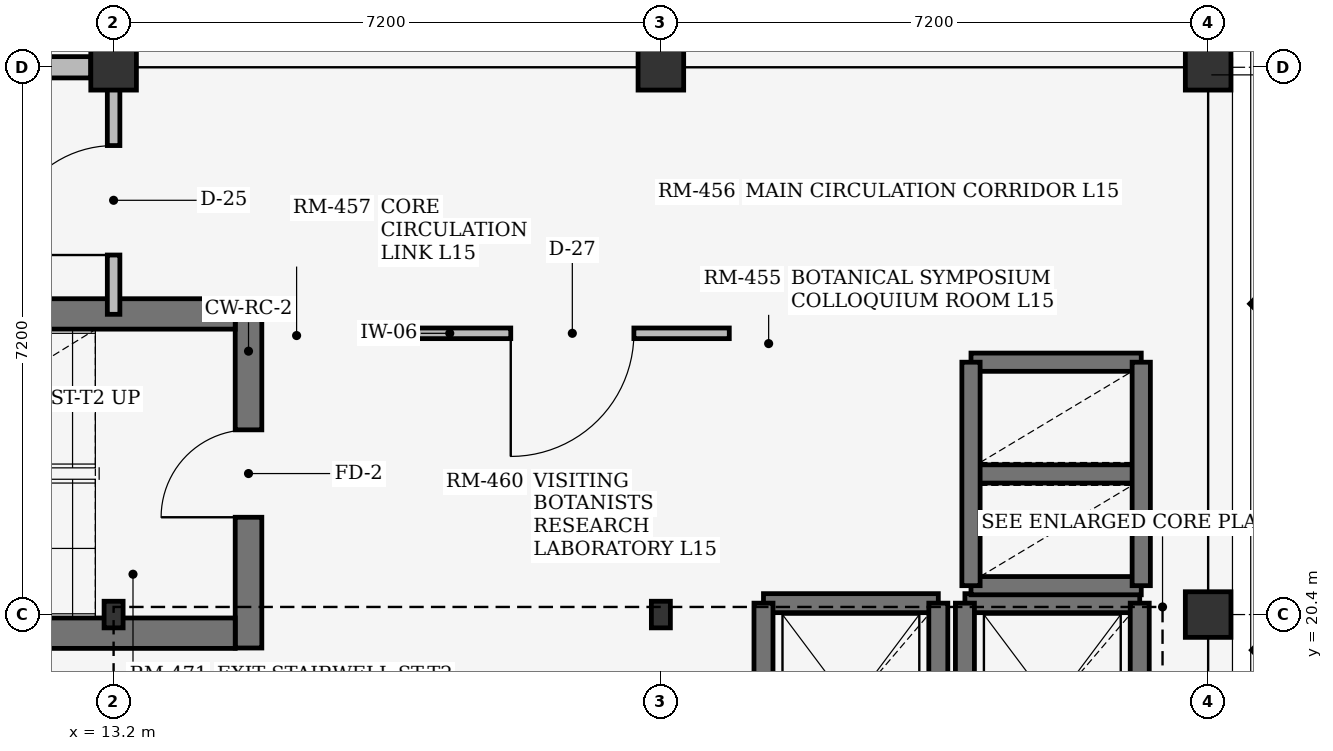
"""IFC4 building model, lengths in metres.
Left out: names, types, materials, properties, quantities, classifications, styles, units other than length and angle.
Written with IfcOpenShell. Run it as: python <this file> out.ifc"""

import sys

from ifc_helpers import new_model, si_unit, direction, frame, frame_2d, origin, origin_2d, place, context, subcontext, project, spatial, rectangle, i_section, extrude, element, fill, save


model = new_model("IFC4")
c1 = context("Model", 3, precision=1e-05, world=origin(), true_north=direction((0.0, 1.0)))
c2 = subcontext(c1, "Body", "Model", "MODEL_VIEW")
j1 = project(units=[si_unit("LENGTHUNIT", "METRE"), si_unit("PLANEANGLEUNIT", "RADIAN")], contexts=[c1])
p1 = place(None, origin())
s1 = spatial("IfcSite", under=j1, at=p1, CompositionType="ELEMENT")
p2 = place(p1, origin())
s2 = spatial("IfcBuilding", under=s1, at=p2, CompositionType="ELEMENT")
p3 = place(p2, frame((0.0, 0.0, 59.4)))
s3 = spatial("IfcBuildingStorey", under=s2, at=p3, CompositionType="ELEMENT", Elevation=59.4)
p4 = place(p3, frame((13.2, 20.4, 0.0), z_axis=(0.0, 0.0, 1.0), x_axis=(1.0, 0.0, 0.0)))
e1 = element("IfcColumn", 1, at=p4, inside=s3, PredefinedType="COLUMN", context=c2, shape_type="SweptSolid", body=[
    extrude(i_section(OverallWidth=0.25, OverallDepth=0.35, WebThickness=0.01, FlangeThickness=0.012, at=origin_2d()), origin(), (0.0, 0.0, 1.0), 3.53),
])
p5 = place(p3, frame((13.2, 27.6, 0.0), z_axis=(0.0, 0.0, 1.0), x_axis=(1.0, 0.0, 0.0)))
e2 = element("IfcColumn", 2, at=p5, inside=s3, PredefinedType="COLUMN", context=c2, shape_type="SweptSolid", body=[
    extrude(rectangle(XDim=0.6, YDim=0.6, at=origin_2d()), origin(), (0.0, 0.0, 1.0), 3.53),
])
p6 = place(p3, frame((20.4, 20.4, 0.0), z_axis=(0.0, 0.0, 1.0), x_axis=(1.0, 0.0, 0.0)))
e3 = element("IfcColumn", 3, at=p6, inside=s3, PredefinedType="COLUMN", context=c2, shape_type="SweptSolid", body=[
    extrude(i_section(OverallWidth=0.25, OverallDepth=0.35, WebThickness=0.01, FlangeThickness=0.012, at=origin_2d()), origin(), (0.0, 0.0, 1.0), 3.53),
])
for number, where, z_axis, x_axis in (
    (4, (20.4, 27.6, 0.0), (0.0, 0.0, 1.0), (1.0, 0.0, 0.0)),
    (5, (27.6, 20.4, 0.0), (0.0, 0.0, 1.0), (1.0, 0.0, 0.0)),
    (6, (27.6, 27.6, 0.0), (0.0, 0.0, 1.0), (1.0, 0.0, 0.0)),
):
    element("IfcColumn", number, at=place(p3, frame(where, z_axis=z_axis, x_axis=x_axis)), inside=s3, PredefinedType="COLUMN", context=c2, shape_type="SweptSolid", body=[
        extrude(rectangle(XDim=0.6, YDim=0.6, at=origin_2d()), origin(), (0.0, 0.0, 1.0), 3.53),
    ])
p7 = place(p3, frame((6.3, 27.6, 0.0), z_axis=(0.0, 0.0, 1.0), x_axis=(1.0, 0.0, 0.0)))
e7 = element("IfcWall", 7, at=p7, inside=s3, PredefinedType="STANDARD", context=c2, shape_type="SweptSolid", body=[
    extrude(rectangle(XDim=6.6, YDim=0.28, at=frame_2d((3.3, 0.0))), origin(), (0.0, 0.0, 1.0), 3.11),
])
p8 = place(p7, frame((2.175, 0.0, 0.75)))
e8 = element("IfcOpeningElement", 8, at=p8, cuts=e7, PredefinedType="OPENING", context=c2, shape_type="SweptSolid", body=[
    extrude(rectangle(XDim=2.25, YDim=1.5, at=frame_2d((1.125, 0.75))), frame((0.0, 0.15, 0.0), z_axis=(0.0, -1.0, 0.0), x_axis=(1.0, 0.0, 0.0)), (0.0, 0.0, 1.0), 0.3),
])
p9 = place(p3, frame((14.975, 24.55, 0.0), z_axis=(0.0, 0.0, 1.0), x_axis=(0.0, -1.0, 0.0)))
e9 = element("IfcWall", 9, at=p9, inside=s3, PredefinedType="SHEAR", context=c2, shape_type="SweptSolid", body=[
    extrude(rectangle(XDim=4.59, YDim=0.35, at=frame_2d((2.295, 0.0))), origin(), (0.0, 0.0, 1.0), 3.53),
])
p10 = place(p9, frame((1.72, 0.0, 0.0)))
e10 = element("IfcOpeningElement", 10, at=p10, cuts=e9, PredefinedType="OPENING", context=c2, shape_type="SweptSolid", body=[
    extrude(rectangle(XDim=1.15, YDim=2.2, at=frame_2d((0.575, 1.1))), frame((0.0, 0.185, 0.0), z_axis=(0.0, -1.0, 0.0), x_axis=(1.0, 0.0, 0.0)), (0.0, 0.0, 1.0), 0.37),
])
for number, where, z_axis, x_axis in (
    (11, (14.8, 24.355, 0.0), (0.0, 0.0, 1.0), (-1.0, 0.0, 0.0)),
    (12, (14.8, 20.155, 0.0), (0.0, 0.0, 1.0), (-1.0, 0.0, 0.0)),
):
    element("IfcWall", number, at=place(p3, frame(where, z_axis=z_axis, x_axis=x_axis)), inside=s3, PredefinedType="SHEAR", context=c2, shape_type="SweptSolid", body=[
        extrude(rectangle(XDim=7.98, YDim=0.4, at=frame_2d((3.99, 0.0))), origin(), (0.0, 0.0, 1.0), 3.53),
    ])
p11 = place(p3, frame((21.75, 20.55, 0.0), z_axis=(0.0, 0.0, 1.0), x_axis=(1.0, 0.0, 0.0)))
e13 = element("IfcWall", 13, at=p11, inside=s3, PredefinedType="SHEAR", context=c2, shape_type="SweptSolid", body=[
    extrude(rectangle(XDim=2.3, YDim=0.25, at=frame_2d((1.15, 0.0))), origin(), (0.0, 0.0, 1.0), 3.53),
])
for number, where, z_axis, x_axis in (
    (14, (21.75, 17.85, 0.0), (0.0, 0.0, 1.0), (0.0, 1.0, 0.0)),
    (15, (24.05, 17.85, 0.0), (0.0, 0.0, 1.0), (0.0, 1.0, 0.0)),
):
    element("IfcWall", number, at=place(p3, frame(where, z_axis=z_axis, x_axis=x_axis)), inside=s3, PredefinedType="SHEAR", context=c2, shape_type="SweptSolid", body=[
        extrude(rectangle(XDim=2.7, YDim=0.25, at=frame_2d((1.35, 0.0))), origin(), (0.0, 0.0, 1.0), 3.53),
    ])
p12 = place(p3, frame((24.4, 20.55, 0.0), z_axis=(0.0, 0.0, 1.0), x_axis=(1.0, 0.0, 0.0)))
e16 = element("IfcWall", 16, at=p12, inside=s3, PredefinedType="SHEAR", context=c2, shape_type="SweptSolid", body=[
    extrude(rectangle(XDim=2.3, YDim=0.25, at=frame_2d((1.15, 0.0))), origin(), (0.0, 0.0, 1.0), 3.53),
])
for number, where, z_axis, x_axis in (
    (17, (24.4, 17.85, 0.0), (0.0, 0.0, 1.0), (0.0, 1.0, 0.0)),
    (18, (26.7, 17.85, 0.0), (0.0, 0.0, 1.0), (0.0, 1.0, 0.0)),
):
    element("IfcWall", number, at=place(p3, frame(where, z_axis=z_axis, x_axis=x_axis)), inside=s3, PredefinedType="SHEAR", context=c2, shape_type="SweptSolid", body=[
        extrude(rectangle(XDim=2.7, YDim=0.25, at=frame_2d((1.35, 0.0))), origin(), (0.0, 0.0, 1.0), 3.53),
    ])
for number, where, z_axis, x_axis in (
    (19, (24.48, 20.78, 0.0), (0.0, 0.0, 1.0), (1.0, 0.0, 0.0)),
    (20, (24.48, 22.25, 0.0), (0.0, 0.0, 1.0), (1.0, 0.0, 0.0)),
    (21, (24.48, 23.72, 0.0), (0.0, 0.0, 1.0), (1.0, 0.0, 0.0)),
):
    element("IfcWall", number, at=place(p3, frame(where, z_axis=z_axis, x_axis=x_axis)), inside=s3, PredefinedType="SHEAR", context=c2, shape_type="SweptSolid", body=[
        extrude(rectangle(XDim=2.24, YDim=0.24, at=frame_2d((1.12, 0.0))), origin(), (0.0, 0.0, 1.0), 3.53),
    ])
for number, where, z_axis, x_axis in (
    (22, (24.48, 20.78, 0.0), (0.0, 0.0, 1.0), (0.0, 1.0, 0.0)),
    (23, (26.72, 20.78, 0.0), (0.0, 0.0, 1.0), (0.0, 1.0, 0.0)),
):
    element("IfcWall", number, at=place(p3, frame(where, z_axis=z_axis, x_axis=x_axis)), inside=s3, PredefinedType="SHEAR", context=c2, shape_type="SweptSolid", body=[
        extrude(rectangle(XDim=2.94, YDim=0.24, at=frame_2d((1.47, 0.0))), origin(), (0.0, 0.0, 1.0), 3.53),
    ])
p13 = place(p3, frame((13.2, 24.35, 0.0), z_axis=(0.0, 0.0, 1.0), x_axis=(0.0, 1.0, 0.0)))
e24 = element("IfcWall", 24, at=p13, inside=s3, PredefinedType="PARTITIONING", context=c2, shape_type="SweptSolid", body=[
    extrude(rectangle(XDim=3.0, YDim=0.165, at=frame_2d((1.5, 0.0))), origin(), (0.0, 0.0, 1.0), 3.12),
])
p14 = place(p13, frame((0.78, 0.0, 0.0)))
e25 = element("IfcOpeningElement", 25, at=p14, cuts=e24, PredefinedType="OPENING", context=c2, shape_type="SweptSolid", body=[
    extrude(rectangle(XDim=1.44, YDim=2.24, at=frame_2d((0.72, 1.12))), frame((0.0, 0.093, 0.0), z_axis=(0.0, -1.0, 0.0), x_axis=(1.0, 0.0, 0.0)), (0.0, 0.0, 1.0), 0.185),
])
p15 = place(p3, frame((17.17, 24.1, 0.0), z_axis=(0.0, 0.0, 1.0), x_axis=(1.0, 0.0, 0.0)))
e26 = element("IfcWall", 26, at=p15, inside=s3, PredefinedType="PARTITIONING", context=c2, shape_type="SweptSolid", body=[
    extrude(rectangle(XDim=4.13, YDim=0.14, at=frame_2d((2.065, 0.0))), origin(), (0.0, 0.0, 1.0), 3.51),
])
p16 = place(p15, frame((1.255, 0.0, 0.0)))
e27 = element("IfcOpeningElement", 27, at=p16, cuts=e26, PredefinedType="OPENING", context=c2, shape_type="SweptSolid", body=[
    extrude(rectangle(XDim=1.62, YDim=2.28, at=frame_2d((0.81, 1.14))), frame((0.0, 0.08, 0.0), z_axis=(0.0, -1.0, 0.0), x_axis=(1.0, 0.0, 0.0)), (0.0, 0.0, 1.0), 0.16),
])
p17 = place(p10, origin())
e28 = element("IfcDoor", 28, at=p17, inside=s3, OperationType="SINGLE_SWING_RIGHT", PredefinedType="DOOR", context=c2, shape_type="SweptSolid", body=[
    extrude(rectangle(XDim=1.15, YDim=2.2, at=frame_2d((0.575, 1.1))), frame((0.0, 0.025, 0.0), z_axis=(0.0, -1.0, 0.0), x_axis=(1.0, 0.0, 0.0)), (0.0, 0.0, 1.0), 0.05),
])
fill(e10, e28)
p18 = place(p14, origin())
e29 = element("IfcDoor", 29, at=p18, inside=s3, OperationType="SINGLE_SWING_LEFT", PredefinedType="DOOR", context=c2, shape_type="SweptSolid", body=[
    extrude(rectangle(XDim=1.44, YDim=2.24, at=frame_2d((0.72, 1.12))), frame((0.0, 0.025, 0.0), z_axis=(0.0, -1.0, 0.0), x_axis=(1.0, 0.0, 0.0)), (0.0, 0.0, 1.0), 0.05),
])
fill(e25, e29)
p19 = place(p16, frame((1.62, 0.0, 0.0), z_axis=(0.0, 0.0, 1.0), x_axis=(-1.0, 0.0, 0.0)))
e30 = element("IfcDoor", 30, at=p19, inside=s3, OperationType="DOUBLE_DOOR_SINGLE_SWING", PredefinedType="DOOR", context=c2, shape_type="SweptSolid", body=[
    extrude(rectangle(XDim=1.62, YDim=2.28, at=frame_2d((0.81, 1.14))), frame((0.0, 0.025, 0.0), z_axis=(0.0, -1.0, 0.0), x_axis=(1.0, 0.0, 0.0)), (0.0, 0.0, 1.0), 0.05),
])
fill(e27, e30)
save(model, sys.argv[1])
